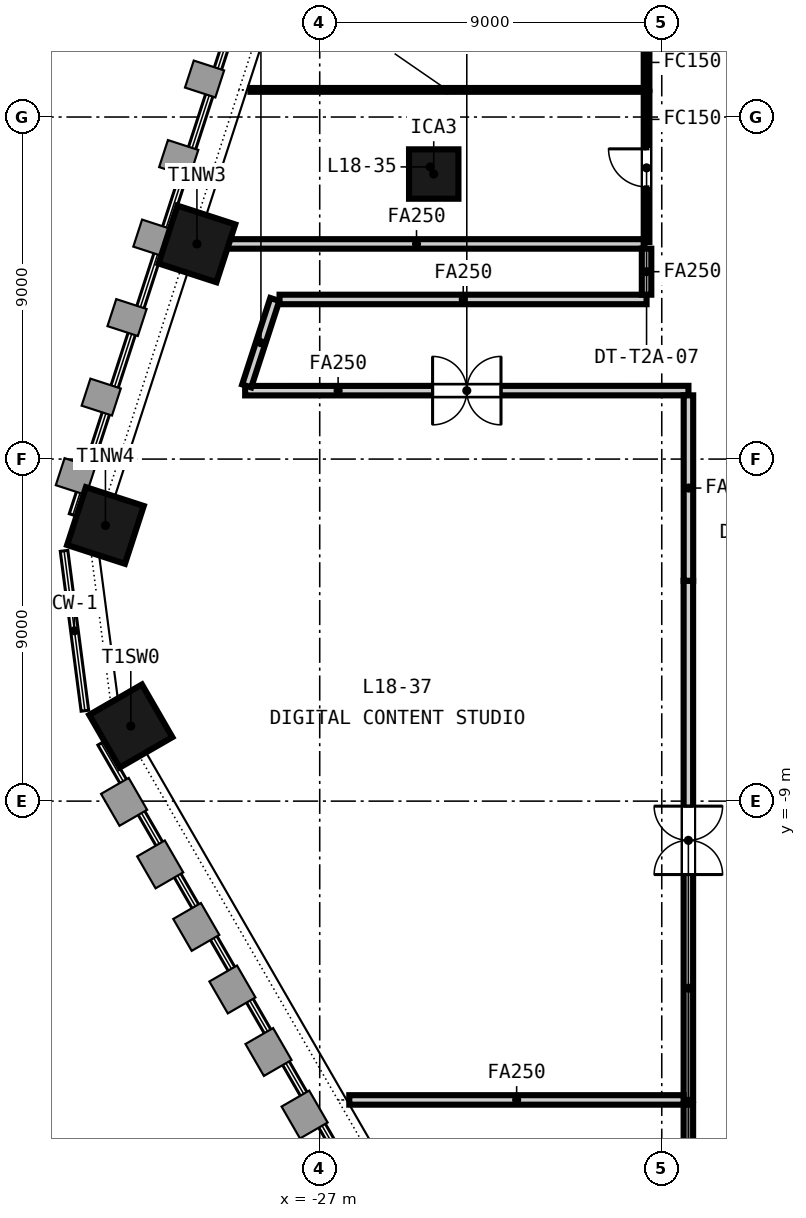
"""IFC4 building model, lengths in metres.
Left out: names, types, materials, properties, quantities, classifications, styles, units other than length and angle.
Written with IfcOpenShell. Run it as: python <this file> out.ifc"""

import sys

from ifc_helpers import new_model, si_unit, direction, frame, frame_2d, origin, origin_2d, place, context, subcontext, project, spatial, rectangle, extrude, element, fill, save


model = new_model("IFC4")
c1 = context("Model", 3, precision=1e-05, world=origin(), true_north=direction((0.0, 1.0)))
c2 = subcontext(c1, "Body", "Model", "MODEL_VIEW")
j1 = project(units=[si_unit("LENGTHUNIT", "METRE"), si_unit("PLANEANGLEUNIT", "RADIAN")], contexts=[c1])
p1 = place(None, origin())
s1 = spatial("IfcSite", under=j1, at=p1, CompositionType="ELEMENT")
p2 = place(p1, origin())
s2 = spatial("IfcBuilding", under=s1, at=p2, CompositionType="ELEMENT")
p3 = place(p2, frame((0.0, 0.0, 80.65)))
s3 = spatial("IfcBuildingStorey", under=s2, at=p3, CompositionType="ELEMENT", Elevation=80.65)
for number, where, z_axis, x_axis in (
    (1, (-30.231, 5.661, -0.15), (0.0, 0.0, 1.0), (-0.309, -0.951, 0.0)),
    (2, (-32.638, -1.747, -0.15), (0.0, 0.0, 1.0), (-0.309, -0.951, 0.0)),
    (3, (-31.971, -7.025, -0.15), (0.0, 0.0, 1.0), (0.5, -0.866, 0.0)),
):
    element("IfcColumn", number, at=place(p3, frame(where, z_axis=z_axis, x_axis=x_axis)), inside=s3, PredefinedType="COLUMN", context=c2, shape_type="SweptSolid", body=[
        extrude(rectangle(XDim=1.6, YDim=1.6, at=origin_2d()), origin(), (0.0, 0.0, 1.0), 3.65),
    ])
p4 = place(p3, frame((-24.0, 7.5, -0.15), z_axis=(0.0, 0.0, 1.0), x_axis=(1.0, 0.0, 0.0)))
e4 = element("IfcColumn", 4, at=p4, inside=s3, PredefinedType="COLUMN", context=c2, shape_type="SweptSolid", body=[
    extrude(rectangle(XDim=1.3, YDim=1.3, at=origin_2d()), origin(), (0.0, 0.0, 1.0), 3.65),
])
p5 = place(p3, frame((-17.298, 1.802, 0.0), z_axis=(0.0, 0.0, 1.0), x_axis=(-0.99999998598, -0.000167451594, 0.0)))
e5 = element("IfcWall", 5, at=p5, inside=s3, PredefinedType="PARTITIONING", context=c2, shape_type="SweptSolid", body=[
    extrude(rectangle(XDim=11.664, YDim=0.25, at=frame_2d((5.832, 0.0))), origin(), (0.0, 0.0, 1.0), 2.741),
])
p6 = place(p5, frame((4.932, 0.0, 0.0)))
e6 = element("IfcOpeningElement", 6, at=p6, cuts=e5, PredefinedType="OPENING", context=c2, shape_type="SweptSolid", body=[
    extrude(rectangle(XDim=1.8, YDim=2.1, at=frame_2d((0.9, 1.05))), frame((0.0, 0.135, 0.0), z_axis=(0.0, -1.0, 0.0), x_axis=(1.0, 0.0, 0.0)), (0.0, 0.0, 1.0), 0.27),
])
p7 = place(p3, frame((-18.4, 9.714, 0.0), z_axis=(0.0, 0.0, 1.0), x_axis=(0.0, 1.0, 0.0)))
e7 = element("IfcWall", 7, at=p7, inside=s3, PredefinedType="PARTITIONING", context=c2, shape_type="SweptSolid", body=[
    extrude(rectangle(XDim=3.991, YDim=0.15, at=frame_2d((1.996, 0.0))), origin(), (0.0, 0.0, 1.0), 2.741),
])
p8 = place(p7, frame((1.496, 0.0, 0.0)))
e8 = element("IfcOpeningElement", 8, at=p8, cuts=e7, PredefinedType="OPENING", context=c2, shape_type="SweptSolid", body=[
    extrude(rectangle(XDim=1.0, YDim=2.1, at=frame_2d((0.5, 1.05))), frame((0.0, 0.085, 0.0), z_axis=(0.0, -1.0, 0.0), x_axis=(1.0, 0.0, 0.0)), (0.0, 0.0, 1.0), 0.17),
])
p9 = place(p3, frame((-28.824, 9.714, 0.0), z_axis=(0.0, 0.0, 1.0), x_axis=(1.0, 0.0, 0.0)))
e9 = element("IfcWall", 9, at=p9, inside=s3, PredefinedType="PARTITIONING", context=c2, shape_type="SweptSolid", body=[
    extrude(rectangle(XDim=10.349, YDim=0.1, at=frame_2d((5.174, 0.0))), origin(), (0.0, 0.0, 1.0), 2.741),
])
p10 = place(p3, frame((-18.4, 5.711, 0.0), z_axis=(0.0, 0.0, 1.0), x_axis=(0.0, 1.0, 0.0)))
e10 = element("IfcWall", 10, at=p10, inside=s3, PredefinedType="PARTITIONING", context=c2, shape_type="SweptSolid", body=[
    extrude(rectangle(XDim=3.953, YDim=0.15, at=frame_2d((1.977, 0.0))), origin(), (0.0, 0.0, 1.0), 2.741),
])
p11 = place(p10, frame((1.451, 0.0, 0.0)))
e11 = element("IfcOpeningElement", 11, at=p11, cuts=e10, PredefinedType="OPENING", context=c2, shape_type="SweptSolid", body=[
    extrude(rectangle(XDim=1.0, YDim=2.1, at=frame_2d((0.5, 1.05))), frame((0.0, 0.085, 0.0), z_axis=(0.0, -1.0, 0.0), x_axis=(1.0, 0.0, 0.0)), (0.0, 0.0, 1.0), 0.17),
])
p12 = place(p3, frame((-30.441, 5.661, 0.0), z_axis=(0.0, 0.0, 1.0), x_axis=(1.0, 0.0, 0.0)))
e12 = element("IfcWall", 12, at=p12, inside=s3, PredefinedType="PARTITIONING", context=c2, shape_type="SweptSolid", body=[
    extrude(rectangle(XDim=11.966, YDim=0.25, at=frame_2d((5.983, 0.0))), origin(), (0.0, 0.0, 1.0), 2.741),
])
p13 = place(p3, frame((-28.921, 1.925, 0.0), z_axis=(0.0, 0.0, 1.0), x_axis=(0.309146074309, 0.951014565998, 0.0)))
e13 = element("IfcWall", 13, at=p13, inside=s3, PredefinedType="PARTITIONING", context=c2, shape_type="SweptSolid", body=[
    extrude(rectangle(XDim=2.392, YDim=0.25, at=frame_2d((1.196, 0.0))), origin(), (0.0, 0.0, 1.0), 2.741),
])
p14 = place(p3, frame((-28.057, 4.2, 0.0), z_axis=(0.0, 0.0, 1.0), x_axis=(1.0, 0.0, 0.0)))
e14 = element("IfcWall", 14, at=p14, inside=s3, PredefinedType="PARTITIONING", context=c2, shape_type="SweptSolid", body=[
    extrude(rectangle(XDim=9.657, YDim=0.25, at=frame_2d((4.829, 0.0))), origin(), (0.0, 0.0, 1.0), 2.741),
])
p15 = place(p3, frame((-18.4, 4.325, 0.0), z_axis=(0.0, 0.0, 1.0), x_axis=(0.0, 1.0, 0.0)))
e15 = element("IfcWall", 15, at=p15, inside=s3, PredefinedType="PARTITIONING", context=c2, shape_type="SweptSolid", body=[
    extrude(rectangle(XDim=1.211, YDim=0.25, at=frame_2d((0.605, 0.0))), origin(), (0.0, 0.0, 1.0), 2.741),
])
p16 = place(p3, frame((-17.3, -16.862, 0.0), z_axis=(0.0, 0.0, 1.0), x_axis=(0.0, 1.0, 0.0)))
e16 = element("IfcWall", 16, at=p16, inside=s3, PredefinedType="PARTITIONING", context=c2, shape_type="SweptSolid", body=[
    extrude(rectangle(XDim=13.66, YDim=0.25, at=frame_2d((6.83, 0.0))), origin(), (0.0, 0.0, 1.0), 2.741),
])
p17 = place(p16, frame((5.93, 0.0, 0.0)))
e17 = element("IfcOpeningElement", 17, at=p17, cuts=e16, PredefinedType="OPENING", context=c2, shape_type="SweptSolid", body=[
    extrude(rectangle(XDim=1.8, YDim=2.1, at=frame_2d((0.9, 1.05))), frame((0.0, 0.135, 0.0), z_axis=(0.0, -1.0, 0.0), x_axis=(1.0, 0.0, 0.0)), (0.0, 0.0, 1.0), 0.27),
])
p18 = place(p3, frame((-17.298, -3.202, 0.0), z_axis=(0.0, 0.0, 1.0), x_axis=(0.0, 1.0, 0.0)))
e18 = element("IfcWall", 18, at=p18, inside=s3, PredefinedType="PARTITIONING", context=c2, shape_type="SweptSolid", body=[
    extrude(rectangle(XDim=4.879, YDim=0.25, at=frame_2d((2.439, 0.0))), origin(), (0.0, 0.0, 1.0), 2.741),
])
p19 = place(p3, frame((-26.222, -16.862, 0.0), z_axis=(0.0, 0.0, 1.0), x_axis=(1.0, 0.0, 0.0)))
e19 = element("IfcWall", 19, at=p19, inside=s3, PredefinedType="PARTITIONING", context=c2, shape_type="SweptSolid", body=[
    extrude(rectangle(XDim=8.797, YDim=0.25, at=frame_2d((4.398, 0.0))), origin(), (0.0, 0.0, 1.0), 2.741),
])
p20 = place(p3, frame((-17.3, -19.075, 0.0), z_axis=(0.0, 0.0, 1.0), x_axis=(0.0, 1.0, 0.0)))
e20 = element("IfcWall", 20, at=p20, inside=s3, PredefinedType="PARTITIONING", context=c2, shape_type="SweptSolid", body=[
    extrude(rectangle(XDim=2.088, YDim=0.25, at=frame_2d((1.044, 0.0))), origin(), (0.0, 0.0, 1.0), 2.741),
])
p21 = place(p11, origin())
e21 = element("IfcDoor", 21, at=p21, inside=s3, OperationType="SINGLE_SWING_RIGHT", PredefinedType="DOOR", context=c2, shape_type="SweptSolid", body=[
    extrude(rectangle(XDim=1.0, YDim=2.1, at=frame_2d((0.5, 1.05))), frame((0.0, 0.025, 0.0), z_axis=(0.0, -1.0, 0.0), x_axis=(1.0, 0.0, 0.0)), (0.0, 0.0, 1.0), 0.05),
])
fill(e11, e21)
p22 = place(p17, origin())
e22 = element("IfcDoor", 22, at=p22, inside=s3, OperationType="DOUBLE_DOOR_DOUBLE_SWING", PredefinedType="DOOR", context=c2, shape_type="SweptSolid", body=[
    extrude(rectangle(XDim=1.8, YDim=2.1, at=frame_2d((0.9, 1.05))), frame((0.0, 0.025, 0.0), z_axis=(0.0, -1.0, 0.0), x_axis=(1.0, 0.0, 0.0)), (0.0, 0.0, 1.0), 0.05),
])
fill(e17, e22)
p23 = place(p6, origin())
e23 = element("IfcDoor", 23, at=p23, inside=s3, OperationType="DOUBLE_DOOR_DOUBLE_SWING", PredefinedType="DOOR", context=c2, shape_type="SweptSolid", body=[
    extrude(rectangle(XDim=1.8, YDim=2.1, at=frame_2d((0.9, 1.05))), frame((0.0, 0.025, 0.0), z_axis=(0.0, -1.0, 0.0), x_axis=(1.0, 0.0, 0.0)), (0.0, 0.0, 1.0), 0.05),
])
fill(e6, e23)
save(model, sys.argv[1])
